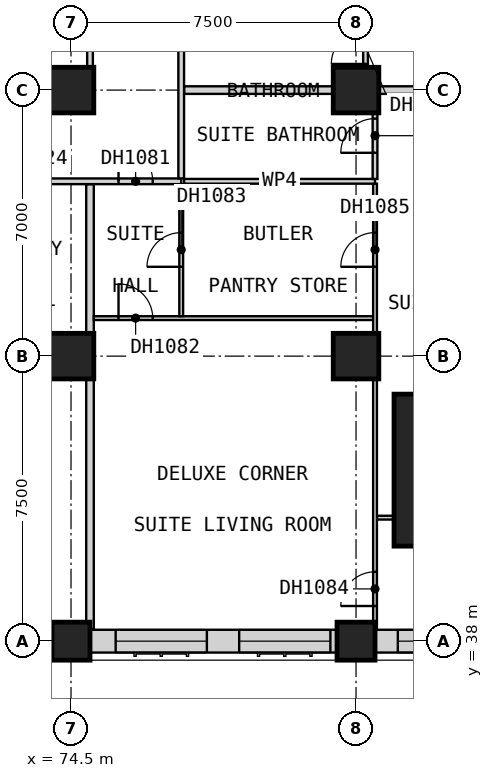
"""IFC4 building model, lengths in metres.
Left out: names, types, materials, properties, quantities, classifications, styles, units other than length and angle.
Written with IfcOpenShell. Run it as: python <this file> out.ifc"""

import sys

from ifc_helpers import new_model, si_unit, direction, frame, frame_2d, origin, origin_2d, place, context, subcontext, project, spatial, rectangle, extrude, element, fill, save


model = new_model("IFC4")
c1 = context("Model", 3, precision=1e-05, world=origin(), true_north=direction((0.0, 1.0)))
c2 = subcontext(c1, "Body", "Model", "MODEL_VIEW")
j1 = project(units=[si_unit("LENGTHUNIT", "METRE"), si_unit("PLANEANGLEUNIT", "RADIAN")], contexts=[c1])
p1 = place(None, origin())
s1 = spatial("IfcSite", under=j1, at=p1, CompositionType="ELEMENT")
p2 = place(p1, origin())
s2 = spatial("IfcBuilding", under=s1, at=p2, CompositionType="ELEMENT")
p3 = place(p2, frame((0.0, 0.0, 48.4)))
s3 = spatial("IfcBuildingStorey", under=s2, at=p3, CompositionType="ELEMENT", Elevation=48.4)
p4 = place(p3, frame((74.5, 38.0, 0.0), z_axis=(0.0, 0.0, 1.0), x_axis=(1.0, 0.0, 0.0)))
e1 = element("IfcColumn", 1, at=p4, inside=s3, PredefinedType="COLUMN", context=c2, shape_type="SweptSolid", body=[
    extrude(rectangle(XDim=1.0, YDim=1.0, at=origin_2d()), origin(), (0.0, 0.0, 1.0), 3.6),
])
for number, where, z_axis, x_axis in (
    (2, (74.5, 45.5, 0.0), (0.0, 0.0, 1.0), (1.0, 0.0, 0.0)),
    (3, (74.5, 52.5, 0.0), (0.0, 0.0, 1.0), (1.0, 0.0, 0.0)),
):
    element("IfcColumn", number, at=place(p3, frame(where, z_axis=z_axis, x_axis=x_axis)), inside=s3, PredefinedType="COLUMN", context=c2, shape_type="SweptSolid", body=[
        extrude(rectangle(XDim=1.2, YDim=1.2, at=origin_2d()), origin(), (0.0, 0.0, 1.0), 3.6),
    ])
p5 = place(p3, frame((82.0, 38.0, 0.0), z_axis=(0.0, 0.0, 1.0), x_axis=(1.0, 0.0, 0.0)))
e4 = element("IfcColumn", 4, at=p5, inside=s3, PredefinedType="COLUMN", context=c2, shape_type="SweptSolid", body=[
    extrude(rectangle(XDim=1.0, YDim=1.0, at=origin_2d()), origin(), (0.0, 0.0, 1.0), 3.6),
])
for number, where, z_axis, x_axis in (
    (5, (82.0, 45.5, 0.0), (0.0, 0.0, 1.0), (1.0, 0.0, 0.0)),
    (6, (82.0, 52.5, 0.0), (0.0, 0.0, 1.0), (1.0, 0.0, 0.0)),
):
    element("IfcColumn", number, at=place(p3, frame(where, z_axis=z_axis, x_axis=x_axis)), inside=s3, PredefinedType="COLUMN", context=c2, shape_type="SweptSolid", body=[
        extrude(rectangle(XDim=1.2, YDim=1.2, at=origin_2d()), origin(), (0.0, 0.0, 1.0), 3.6),
    ])
p6 = place(p3, frame((85.0, 42.5, 0.0), z_axis=(0.0, 0.0, 1.0), x_axis=(1.0, 0.0, 0.0)))
e7 = element("IfcColumn", 7, at=p6, inside=s3, PredefinedType="COLUMN", context=c2, shape_type="SweptSolid", body=[
    extrude(rectangle(XDim=4.0, YDim=4.0, at=origin_2d()), origin(), (0.0, 0.0, 1.0), 3.6),
])
p7 = place(p3, frame((75.0, 38.0, 0.0), z_axis=(0.0, 0.0, 1.0), x_axis=(1.0, 0.0, 0.0)))
e8 = element("IfcWall", 8, at=p7, inside=s3, PredefinedType="SOLIDWALL", context=c2, shape_type="SweptSolid", body=[
    extrude(rectangle(XDim=6.5, YDim=0.6, at=frame_2d((3.25, 0.0))), origin(), (0.0, 0.0, 1.0), 2.85),
])
p8 = place(p7, frame((0.675, 0.0, 0.8)))
e9 = element("IfcOpeningElement", 9, at=p8, cuts=e8, PredefinedType="OPENING", context=c2, shape_type="SweptSolid", body=[
    extrude(rectangle(XDim=2.4, YDim=1.8, at=frame_2d((1.2, 0.9))), frame((0.0, 0.31, 0.0), z_axis=(0.0, -1.0, 0.0), x_axis=(1.0, 0.0, 0.0)), (0.0, 0.0, 1.0), 0.62),
])
p9 = place(p7, frame((3.925, 0.0, 0.8)))
e10 = element("IfcOpeningElement", 10, at=p9, cuts=e8, PredefinedType="OPENING", context=c2, shape_type="SweptSolid", body=[
    extrude(rectangle(XDim=2.4, YDim=1.8, at=frame_2d((1.2, 0.9))), frame((0.0, 0.31, 0.0), z_axis=(0.0, -1.0, 0.0), x_axis=(1.0, 0.0, 0.0)), (0.0, 0.0, 1.0), 0.62),
])
p10 = place(p3, frame((82.5, 38.0, 0.0), z_axis=(0.0, 0.0, 1.0), x_axis=(1.0, 0.0, 0.0)))
e11 = element("IfcWall", 11, at=p10, inside=s3, PredefinedType="SOLIDWALL", context=c2, shape_type="SweptSolid", body=[
    extrude(rectangle(XDim=4.5, YDim=0.6, at=frame_2d((2.25, 0.0))), origin(), (0.0, 0.0, 1.0), 3.35),
])
p11 = place(p10, frame((0.6, 0.0, 0.8)))
e12 = element("IfcOpeningElement", 12, at=p11, cuts=e11, PredefinedType="OPENING", context=c2, shape_type="SweptSolid", body=[
    extrude(rectangle(XDim=2.4, YDim=1.8, at=frame_2d((1.2, 0.9))), frame((0.0, 0.31, 0.0), z_axis=(0.0, -1.0, 0.0), x_axis=(1.0, 0.0, 0.0)), (0.0, 0.0, 1.0), 0.62),
])
p12 = place(p3, frame((77.475, 52.5, 0.0), z_axis=(0.0, 0.0, 1.0), x_axis=(1.0, 0.0, 0.0)))
e13 = element("IfcWall", 13, at=p12, inside=s3, PredefinedType="PARTITIONING", context=c2, shape_type="SweptSolid", body=[
    extrude(rectangle(XDim=12.525, YDim=0.2, at=frame_2d((6.262, 0.0))), origin(), (0.0, 0.0, 1.0), 3.35),
])
p13 = place(p3, frame((75.0, 38.31, 0.0), z_axis=(0.0, 0.0, 1.0), x_axis=(0.0, 1.0, 0.0)))
e14 = element("IfcWall", 14, at=p13, inside=s3, PredefinedType="PARTITIONING", context=c2, shape_type="SweptSolid", body=[
    extrude(rectangle(XDim=11.715, YDim=0.2, at=frame_2d((5.857, 0.0))), origin(), (0.0, 0.0, 1.0), 3.35),
])
p14 = place(p3, frame((33.75, 50.1, 0.0), z_axis=(0.0, 0.0, 1.0), x_axis=(1.0, 0.0, 0.0)))
e15 = element("IfcWall", 15, at=p14, inside=s3, PredefinedType="PARTITIONING", context=c2, shape_type="SweptSolid", body=[
    extrude(rectangle(XDim=43.65, YDim=0.15, at=frame_2d((21.825, 0.0))), origin(), (0.0, 0.0, 1.0), 3.35),
])
p15 = place(p14, frame((5.175, 0.0, 0.0)))
e16 = element("IfcOpeningElement", 16, at=p15, cuts=e15, PredefinedType="OPENING", context=c2, shape_type="SweptSolid", body=[
    extrude(rectangle(XDim=0.9, YDim=2.1, at=frame_2d((0.45, 1.05))), frame((0.0, 0.085, 0.0), z_axis=(0.0, -1.0, 0.0), x_axis=(1.0, 0.0, 0.0)), (0.0, 0.0, 1.0), 0.17),
])
p16 = place(p14, frame((13.05, 0.0, 0.0)))
e17 = element("IfcOpeningElement", 17, at=p16, cuts=e15, PredefinedType="OPENING", context=c2, shape_type="SweptSolid", body=[
    extrude(rectangle(XDim=0.9, YDim=2.1, at=frame_2d((0.45, 1.05))), frame((0.0, 0.085, 0.0), z_axis=(0.0, -1.0, 0.0), x_axis=(1.0, 0.0, 0.0)), (0.0, 0.0, 1.0), 0.17),
])
p17 = place(p14, frame((17.363, 0.0, 0.0)))
e18 = element("IfcOpeningElement", 18, at=p17, cuts=e15, PredefinedType="OPENING", context=c2, shape_type="SweptSolid", body=[
    extrude(rectangle(XDim=0.9, YDim=2.1, at=frame_2d((0.45, 1.05))), frame((0.0, 0.085, 0.0), z_axis=(0.0, -1.0, 0.0), x_axis=(1.0, 0.0, 0.0)), (0.0, 0.0, 1.0), 0.17),
])
p18 = place(p14, frame((21.113, 0.0, 0.0)))
e19 = element("IfcOpeningElement", 19, at=p18, cuts=e15, PredefinedType="OPENING", context=c2, shape_type="SweptSolid", body=[
    extrude(rectangle(XDim=0.9, YDim=2.1, at=frame_2d((0.45, 1.05))), frame((0.0, 0.085, 0.0), z_axis=(0.0, -1.0, 0.0), x_axis=(1.0, 0.0, 0.0)), (0.0, 0.0, 1.0), 0.17),
])
p19 = place(p14, frame((24.863, 0.0, 0.0)))
e20 = element("IfcOpeningElement", 20, at=p19, cuts=e15, PredefinedType="OPENING", context=c2, shape_type="SweptSolid", body=[
    extrude(rectangle(XDim=0.9, YDim=2.1, at=frame_2d((0.45, 1.05))), frame((0.0, 0.085, 0.0), z_axis=(0.0, -1.0, 0.0), x_axis=(1.0, 0.0, 0.0)), (0.0, 0.0, 1.0), 0.17),
])
p20 = place(p14, frame((28.613, 0.0, 0.0)))
e21 = element("IfcOpeningElement", 21, at=p20, cuts=e15, PredefinedType="OPENING", context=c2, shape_type="SweptSolid", body=[
    extrude(rectangle(XDim=0.9, YDim=2.1, at=frame_2d((0.45, 1.05))), frame((0.0, 0.085, 0.0), z_axis=(0.0, -1.0, 0.0), x_axis=(1.0, 0.0, 0.0)), (0.0, 0.0, 1.0), 0.17),
])
p21 = place(p14, frame((32.363, 0.0, 0.0)))
e22 = element("IfcOpeningElement", 22, at=p21, cuts=e15, PredefinedType="OPENING", context=c2, shape_type="SweptSolid", body=[
    extrude(rectangle(XDim=0.9, YDim=2.1, at=frame_2d((0.45, 1.05))), frame((0.0, 0.085, 0.0), z_axis=(0.0, -1.0, 0.0), x_axis=(1.0, 0.0, 0.0)), (0.0, 0.0, 1.0), 0.17),
])
p22 = place(p14, frame((39.3, 0.0, 0.0)))
e23 = element("IfcOpeningElement", 23, at=p22, cuts=e15, PredefinedType="OPENING", context=c2, shape_type="SweptSolid", body=[
    extrude(rectangle(XDim=0.9, YDim=2.1, at=frame_2d((0.45, 1.05))), frame((0.0, 0.085, 0.0), z_axis=(0.0, -1.0, 0.0), x_axis=(1.0, 0.0, 0.0)), (0.0, 0.0, 1.0), 0.17),
])
p23 = place(p14, frame((42.0, 0.0, 0.0)))
e24 = element("IfcOpeningElement", 24, at=p23, cuts=e15, PredefinedType="OPENING", context=c2, shape_type="SweptSolid", body=[
    extrude(rectangle(XDim=0.9, YDim=2.1, at=frame_2d((0.45, 1.05))), frame((0.0, 0.085, 0.0), z_axis=(0.0, -1.0, 0.0), x_axis=(1.0, 0.0, 0.0)), (0.0, 0.0, 1.0), 0.17),
])
p24 = place(p3, frame((60.0, 52.5, 0.0), z_axis=(0.0, 0.0, 1.0), x_axis=(1.0, 0.0, 0.0)))
e25 = element("IfcWall", 25, at=p24, inside=s3, PredefinedType="PARTITIONING", context=c2, shape_type="SweptSolid", body=[
    extrude(rectangle(XDim=15.0, YDim=0.15, at=frame_2d((7.5, 0.0))), origin(), (0.0, 0.0, 1.0), 3.35),
])
p25 = place(p24, frame((4.875, 0.0, 0.0)))
e26 = element("IfcOpeningElement", 26, at=p25, cuts=e25, PredefinedType="OPENING", context=c2, shape_type="SweptSolid", body=[
    extrude(rectangle(XDim=0.9, YDim=2.1, at=frame_2d((0.45, 1.05))), frame((0.0, 0.085, 0.0), z_axis=(0.0, -1.0, 0.0), x_axis=(1.0, 0.0, 0.0)), (0.0, 0.0, 1.0), 0.17),
])
p26 = place(p24, frame((12.375, 0.0, 0.0)))
e27 = element("IfcOpeningElement", 27, at=p26, cuts=e25, PredefinedType="OPENING", context=c2, shape_type="SweptSolid", body=[
    extrude(rectangle(XDim=0.9, YDim=2.1, at=frame_2d((0.45, 1.05))), frame((0.0, 0.085, 0.0), z_axis=(0.0, -1.0, 0.0), x_axis=(1.0, 0.0, 0.0)), (0.0, 0.0, 1.0), 0.17),
])
p27 = place(p3, frame((75.0, 52.575, 0.0), z_axis=(0.0, 0.0, 1.0), x_axis=(0.0, 1.0, 0.0)))
e28 = element("IfcWall", 28, at=p27, inside=s3, PredefinedType="PARTITIONING", context=c2, shape_type="SweptSolid", body=[
    extrude(rectangle(XDim=11.85, YDim=0.15, at=frame_2d((5.925, 0.0))), origin(), (0.0, 0.0, 1.0), 3.35),
])
p28 = place(p27, frame((9.225, 0.0, 0.0)))
e29 = element("IfcOpeningElement", 29, at=p28, cuts=e28, PredefinedType="OPENING", context=c2, shape_type="SweptSolid", body=[
    extrude(rectangle(XDim=0.9, YDim=2.1, at=frame_2d((0.45, 1.05))), frame((0.0, 0.085, 0.0), z_axis=(0.0, -1.0, 0.0), x_axis=(1.0, 0.0, 0.0)), (0.0, 0.0, 1.0), 0.17),
])
p29 = place(p3, frame((77.4, 50.175, 0.0), z_axis=(0.0, 0.0, 1.0), x_axis=(0.0, 1.0, 0.0)))
e30 = element("IfcWall", 30, at=p29, inside=s3, PredefinedType="PARTITIONING", context=c2, shape_type="SweptSolid", body=[
    extrude(rectangle(XDim=42.15, YDim=0.15, at=frame_2d((21.075, 0.0))), origin(), (0.0, 0.0, 1.0), 3.35),
])
p30 = place(p29, frame((4.688, 0.0, 0.0)))
e31 = element("IfcOpeningElement", 31, at=p30, cuts=e30, PredefinedType="OPENING", context=c2, shape_type="SweptSolid", body=[
    extrude(rectangle(XDim=0.9, YDim=2.1, at=frame_2d((0.45, 1.05))), frame((0.0, 0.085, 0.0), z_axis=(0.0, -1.0, 0.0), x_axis=(1.0, 0.0, 0.0)), (0.0, 0.0, 1.0), 0.17),
])
p31 = place(p29, frame((8.438, 0.0, 0.0)))
e32 = element("IfcOpeningElement", 32, at=p31, cuts=e30, PredefinedType="OPENING", context=c2, shape_type="SweptSolid", body=[
    extrude(rectangle(XDim=0.9, YDim=2.1, at=frame_2d((0.45, 1.05))), frame((0.0, 0.085, 0.0), z_axis=(0.0, -1.0, 0.0), x_axis=(1.0, 0.0, 0.0)), (0.0, 0.0, 1.0), 0.17),
])
p32 = place(p29, frame((12.188, 0.0, 0.0)))
e33 = element("IfcOpeningElement", 33, at=p32, cuts=e30, PredefinedType="OPENING", context=c2, shape_type="SweptSolid", body=[
    extrude(rectangle(XDim=0.9, YDim=2.1, at=frame_2d((0.45, 1.05))), frame((0.0, 0.085, 0.0), z_axis=(0.0, -1.0, 0.0), x_axis=(1.0, 0.0, 0.0)), (0.0, 0.0, 1.0), 0.17),
])
p33 = place(p29, frame((15.938, 0.0, 0.0)))
e34 = element("IfcOpeningElement", 34, at=p33, cuts=e30, PredefinedType="OPENING", context=c2, shape_type="SweptSolid", body=[
    extrude(rectangle(XDim=0.9, YDim=2.1, at=frame_2d((0.45, 1.05))), frame((0.0, 0.085, 0.0), z_axis=(0.0, -1.0, 0.0), x_axis=(1.0, 0.0, 0.0)), (0.0, 0.0, 1.0), 0.17),
])
p34 = place(p29, frame((19.688, 0.0, 0.0)))
e35 = element("IfcOpeningElement", 35, at=p34, cuts=e30, PredefinedType="OPENING", context=c2, shape_type="SweptSolid", body=[
    extrude(rectangle(XDim=0.9, YDim=2.1, at=frame_2d((0.45, 1.05))), frame((0.0, 0.085, 0.0), z_axis=(0.0, -1.0, 0.0), x_axis=(1.0, 0.0, 0.0)), (0.0, 0.0, 1.0), 0.17),
])
p35 = place(p29, frame((23.438, 0.0, 0.0)))
e36 = element("IfcOpeningElement", 36, at=p35, cuts=e30, PredefinedType="OPENING", context=c2, shape_type="SweptSolid", body=[
    extrude(rectangle(XDim=0.9, YDim=2.1, at=frame_2d((0.45, 1.05))), frame((0.0, 0.085, 0.0), z_axis=(0.0, -1.0, 0.0), x_axis=(1.0, 0.0, 0.0)), (0.0, 0.0, 1.0), 0.17),
])
p36 = place(p29, frame((27.188, 0.0, 0.0)))
e37 = element("IfcOpeningElement", 37, at=p36, cuts=e30, PredefinedType="OPENING", context=c2, shape_type="SweptSolid", body=[
    extrude(rectangle(XDim=0.9, YDim=2.1, at=frame_2d((0.45, 1.05))), frame((0.0, 0.085, 0.0), z_axis=(0.0, -1.0, 0.0), x_axis=(1.0, 0.0, 0.0)), (0.0, 0.0, 1.0), 0.17),
])
p37 = place(p29, frame((30.938, 0.0, 0.0)))
e38 = element("IfcOpeningElement", 38, at=p37, cuts=e30, PredefinedType="OPENING", context=c2, shape_type="SweptSolid", body=[
    extrude(rectangle(XDim=0.9, YDim=2.1, at=frame_2d((0.45, 1.05))), frame((0.0, 0.085, 0.0), z_axis=(0.0, -1.0, 0.0), x_axis=(1.0, 0.0, 0.0)), (0.0, 0.0, 1.0), 0.17),
])
p38 = place(p29, frame((34.688, 0.0, 0.0)))
e39 = element("IfcOpeningElement", 39, at=p38, cuts=e30, PredefinedType="OPENING", context=c2, shape_type="SweptSolid", body=[
    extrude(rectangle(XDim=0.9, YDim=2.1, at=frame_2d((0.45, 1.05))), frame((0.0, 0.085, 0.0), z_axis=(0.0, -1.0, 0.0), x_axis=(1.0, 0.0, 0.0)), (0.0, 0.0, 1.0), 0.17),
])
p39 = place(p29, frame((38.438, 0.0, 0.0)))
e40 = element("IfcOpeningElement", 40, at=p39, cuts=e30, PredefinedType="OPENING", context=c2, shape_type="SweptSolid", body=[
    extrude(rectangle(XDim=0.9, YDim=2.1, at=frame_2d((0.45, 1.05))), frame((0.0, 0.085, 0.0), z_axis=(0.0, -1.0, 0.0), x_axis=(1.0, 0.0, 0.0)), (0.0, 0.0, 1.0), 0.17),
])
p40 = place(p3, frame((82.55, 41.25, 0.0), z_axis=(0.0, 0.0, 1.0), x_axis=(1.0, 0.0, 0.0)))
e41 = element("IfcWall", 41, at=p40, inside=s3, PredefinedType="PARTITIONING", context=c2, shape_type="SweptSolid", body=[
    extrude(rectangle(XDim=4.44, YDim=0.1, at=frame_2d((2.22, 0.0))), origin(), (0.0, 0.0, 1.0), 3.35),
])
p41 = place(p3, frame((72.062, 45.75, 0.0), z_axis=(0.0, 0.0, 1.0), x_axis=(1.0, 0.0, 0.0)))
e42 = element("IfcWall", 42, at=p41, inside=s3, PredefinedType="PARTITIONING", context=c2, shape_type="SweptSolid", body=[
    extrude(rectangle(XDim=2.837, YDim=0.1, at=frame_2d((1.419, 0.0))), origin(), (0.0, 0.0, 1.0), 3.35),
])
p42 = place(p41, frame((0.887, 0.0, 0.0)))
e43 = element("IfcOpeningElement", 43, at=p42, cuts=e42, PredefinedType="OPENING", context=c2, shape_type="SweptSolid", body=[
    extrude(rectangle(XDim=0.9, YDim=2.1, at=frame_2d((0.45, 1.05))), frame((0.0, 0.06, 0.0), z_axis=(0.0, -1.0, 0.0), x_axis=(1.0, 0.0, 0.0)), (0.0, 0.0, 1.0), 0.12),
])
p43 = place(p3, frame((75.1, 46.5, 0.0), z_axis=(0.0, 0.0, 1.0), x_axis=(1.0, 0.0, 0.0)))
e44 = element("IfcWall", 44, at=p43, inside=s3, PredefinedType="PARTITIONING", context=c2, shape_type="SweptSolid", body=[
    extrude(rectangle(XDim=7.35, YDim=0.1, at=frame_2d((3.675, 0.0))), origin(), (0.0, 0.0, 1.0), 3.35),
])
p44 = place(p43, frame((0.65, 0.0, 0.0)))
e45 = element("IfcOpeningElement", 45, at=p44, cuts=e44, PredefinedType="OPENING", context=c2, shape_type="SweptSolid", body=[
    extrude(rectangle(XDim=0.9, YDim=2.1, at=frame_2d((0.45, 1.05))), frame((0.0, 0.06, 0.0), z_axis=(0.0, -1.0, 0.0), x_axis=(1.0, 0.0, 0.0)), (0.0, 0.0, 1.0), 0.12),
])
p45 = place(p3, frame((77.4, 46.55, 0.0), z_axis=(0.0, 0.0, 1.0), x_axis=(0.0, 1.0, 0.0)))
e46 = element("IfcWall", 46, at=p45, inside=s3, PredefinedType="PARTITIONING", context=c2, shape_type="SweptSolid", body=[
    extrude(rectangle(XDim=3.475, YDim=0.1, at=frame_2d((1.737, 0.0))), origin(), (0.0, 0.0, 1.0), 3.35),
])
p46 = place(p45, frame((1.3, 0.0, 0.0)))
e47 = element("IfcOpeningElement", 47, at=p46, cuts=e46, PredefinedType="OPENING", context=c2, shape_type="SweptSolid", body=[
    extrude(rectangle(XDim=0.9, YDim=2.1, at=frame_2d((0.45, 1.05))), frame((0.0, 0.06, 0.0), z_axis=(0.0, -1.0, 0.0), x_axis=(1.0, 0.0, 0.0)), (0.0, 0.0, 1.0), 0.12),
])
p47 = place(p3, frame((82.5, 38.31, 0.0), z_axis=(0.0, 0.0, 1.0), x_axis=(0.0, 1.0, 0.0)))
e48 = element("IfcWall", 48, at=p47, inside=s3, PredefinedType="PARTITIONING", context=c2, shape_type="SweptSolid", body=[
    extrude(rectangle(XDim=11.728, YDim=0.1, at=frame_2d((5.864, 0.0))), origin(), (0.0, 0.0, 1.0), 3.35),
])
p48 = place(p47, frame((0.615, 0.0, 0.0)))
e49 = element("IfcOpeningElement", 49, at=p48, cuts=e48, PredefinedType="OPENING", context=c2, shape_type="SweptSolid", body=[
    extrude(rectangle(XDim=0.9, YDim=2.1, at=frame_2d((0.45, 1.05))), frame((0.0, 0.06, 0.0), z_axis=(0.0, -1.0, 0.0), x_axis=(1.0, 0.0, 0.0)), (0.0, 0.0, 1.0), 0.12),
])
p49 = place(p47, frame((9.54, 0.0, 0.0)))
e50 = element("IfcOpeningElement", 50, at=p49, cuts=e48, PredefinedType="OPENING", context=c2, shape_type="SweptSolid", body=[
    extrude(rectangle(XDim=0.9, YDim=2.1, at=frame_2d((0.45, 1.05))), frame((0.0, 0.06, 0.0), z_axis=(0.0, -1.0, 0.0), x_axis=(1.0, 0.0, 0.0)), (0.0, 0.0, 1.0), 0.12),
])
p50 = place(p3, frame((77.475, 50.1, 0.0), z_axis=(0.0, 0.0, 1.0), x_axis=(1.0, 0.0, 0.0)))
e51 = element("IfcWall", 51, at=p50, inside=s3, PredefinedType="PARTITIONING", context=c2, shape_type="SweptSolid", body=[
    extrude(rectangle(XDim=5.025, YDim=0.125, at=frame_2d((2.512, 0.0))), origin(), (0.0, 0.0, 1.0), 3.35),
])
p51 = place(p3, frame((82.25, 52.6, 0.0), z_axis=(0.0, 0.0, 1.0), x_axis=(0.0, 1.0, 0.0)))
e52 = element("IfcWall", 52, at=p51, inside=s3, PredefinedType="PARTITIONING", context=c2, shape_type="SweptSolid", body=[
    extrude(rectangle(XDim=1.712, YDim=0.125, at=frame_2d((0.856, 0.0))), origin(), (0.0, 0.0, 1.0), 3.35),
])
p52 = place(p51, frame((0.587, 0.0, 0.0)))
e53 = element("IfcOpeningElement", 53, at=p52, cuts=e52, PredefinedType="OPENING", context=c2, shape_type="SweptSolid", body=[
    extrude(rectangle(XDim=0.9, YDim=2.1, at=frame_2d((0.45, 1.05))), frame((0.0, 0.073, 0.0), z_axis=(0.0, -1.0, 0.0), x_axis=(1.0, 0.0, 0.0)), (0.0, 0.0, 1.0), 0.145),
])
p53 = place(p3, frame((82.5, 50.163, 0.0), z_axis=(0.0, 0.0, 1.0), x_axis=(0.0, 1.0, 0.0)))
e54 = element("IfcWall", 54, at=p53, inside=s3, PredefinedType="PARTITIONING", context=c2, shape_type="SweptSolid", body=[
    extrude(rectangle(XDim=2.237, YDim=0.125, at=frame_2d((1.119, 0.0))), origin(), (0.0, 0.0, 1.0), 3.35),
])
p54 = place(p53, frame((0.688, 0.0, 0.0)))
e55 = element("IfcOpeningElement", 55, at=p54, cuts=e54, PredefinedType="OPENING", context=c2, shape_type="SweptSolid", body=[
    extrude(rectangle(XDim=0.9, YDim=2.1, at=frame_2d((0.45, 1.05))), frame((0.0, 0.073, 0.0), z_axis=(0.0, -1.0, 0.0), x_axis=(1.0, 0.0, 0.0)), (0.0, 0.0, 1.0), 0.145),
])
p55 = place(p8, origin())
e56 = element("IfcWindow", 56, at=p55, inside=s3, PartitioningType="SINGLE_PANEL", PredefinedType="WINDOW", context=c2, shape_type="SweptSolid", body=[
    extrude(rectangle(XDim=2.4, YDim=1.8, at=frame_2d((1.2, 0.9))), frame((0.0, -0.07, 0.0), z_axis=(0.0, -1.0, 0.0), x_axis=(1.0, 0.0, 0.0)), (0.0, 0.0, 1.0), 0.06),
])
fill(e9, e56)
p56 = place(p9, origin())
e57 = element("IfcWindow", 57, at=p56, inside=s3, PartitioningType="SINGLE_PANEL", PredefinedType="WINDOW", context=c2, shape_type="SweptSolid", body=[
    extrude(rectangle(XDim=2.4, YDim=1.8, at=frame_2d((1.2, 0.9))), frame((0.0, -0.07, 0.0), z_axis=(0.0, -1.0, 0.0), x_axis=(1.0, 0.0, 0.0)), (0.0, 0.0, 1.0), 0.06),
])
fill(e10, e57)
p57 = place(p11, origin())
e58 = element("IfcWindow", 58, at=p57, inside=s3, PartitioningType="SINGLE_PANEL", PredefinedType="WINDOW", context=c2, shape_type="SweptSolid", body=[
    extrude(rectangle(XDim=2.4, YDim=1.8, at=frame_2d((1.2, 0.9))), frame((0.0, -0.07, 0.0), z_axis=(0.0, -1.0, 0.0), x_axis=(1.0, 0.0, 0.0)), (0.0, 0.0, 1.0), 0.06),
])
fill(e12, e58)
p58 = place(p52, origin())
e59 = element("IfcDoor", 59, at=p58, inside=s3, OperationType="SINGLE_SWING_RIGHT", PredefinedType="DOOR", context=c2, shape_type="SweptSolid", body=[
    extrude(rectangle(XDim=0.9, YDim=2.1, at=frame_2d((0.45, 1.05))), frame((0.0, 0.025, 0.0), z_axis=(0.0, -1.0, 0.0), x_axis=(1.0, 0.0, 0.0)), (0.0, 0.0, 1.0), 0.05),
])
fill(e53, e59)
p59 = place(p23, origin())
e60 = element("IfcDoor", 60, at=p59, inside=s3, OperationType="SINGLE_SWING_LEFT", PredefinedType="DOOR", context=c2, shape_type="SweptSolid", body=[
    extrude(rectangle(XDim=0.9, YDim=2.1, at=frame_2d((0.45, 1.05))), frame((0.0, 0.025, 0.0), z_axis=(0.0, -1.0, 0.0), x_axis=(1.0, 0.0, 0.0)), (0.0, 0.0, 1.0), 0.05),
])
fill(e24, e60)
p60 = place(p44, origin())
e61 = element("IfcDoor", 61, at=p60, inside=s3, OperationType="SINGLE_SWING_RIGHT", PredefinedType="DOOR", context=c2, shape_type="SweptSolid", body=[
    extrude(rectangle(XDim=0.9, YDim=2.1, at=frame_2d((0.45, 1.05))), frame((0.0, 0.025, 0.0), z_axis=(0.0, -1.0, 0.0), x_axis=(1.0, 0.0, 0.0)), (0.0, 0.0, 1.0), 0.05),
])
fill(e45, e61)
p61 = place(p46, origin())
e62 = element("IfcDoor", 62, at=p61, inside=s3, OperationType="SINGLE_SWING_RIGHT", PredefinedType="DOOR", context=c2, shape_type="SweptSolid", body=[
    extrude(rectangle(XDim=0.9, YDim=2.1, at=frame_2d((0.45, 1.05))), frame((0.0, 0.025, 0.0), z_axis=(0.0, -1.0, 0.0), x_axis=(1.0, 0.0, 0.0)), (0.0, 0.0, 1.0), 0.05),
])
fill(e47, e62)
p62 = place(p48, origin())
e63 = element("IfcDoor", 63, at=p62, inside=s3, OperationType="SINGLE_SWING_LEFT", PredefinedType="DOOR", context=c2, shape_type="SweptSolid", body=[
    extrude(rectangle(XDim=0.9, YDim=2.1, at=frame_2d((0.45, 1.05))), frame((0.0, 0.025, 0.0), z_axis=(0.0, -1.0, 0.0), x_axis=(1.0, 0.0, 0.0)), (0.0, 0.0, 1.0), 0.05),
])
fill(e49, e63)
p63 = place(p49, origin())
e64 = element("IfcDoor", 64, at=p63, inside=s3, OperationType="SINGLE_SWING_RIGHT", PredefinedType="DOOR", context=c2, shape_type="SweptSolid", body=[
    extrude(rectangle(XDim=0.9, YDim=2.1, at=frame_2d((0.45, 1.05))), frame((0.0, 0.025, 0.0), z_axis=(0.0, -1.0, 0.0), x_axis=(1.0, 0.0, 0.0)), (0.0, 0.0, 1.0), 0.05),
])
fill(e50, e64)
p64 = place(p54, origin())
e65 = element("IfcDoor", 65, at=p64, inside=s3, OperationType="SINGLE_SWING_LEFT", PredefinedType="DOOR", context=c2, shape_type="SweptSolid", body=[
    extrude(rectangle(XDim=0.9, YDim=2.1, at=frame_2d((0.45, 1.05))), frame((0.0, 0.025, 0.0), z_axis=(0.0, -1.0, 0.0), x_axis=(1.0, 0.0, 0.0)), (0.0, 0.0, 1.0), 0.05),
])
fill(e55, e65)
save(model, sys.argv[1])
